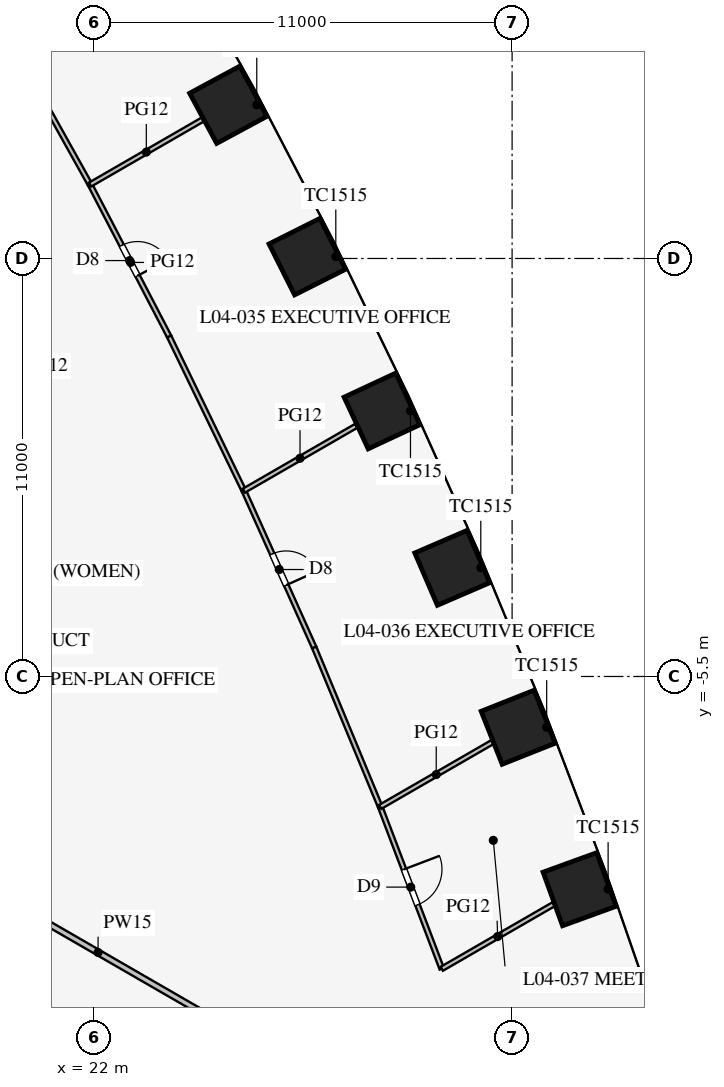
"""IFC4 building model, lengths in metres.
Left out: names, types, materials, properties, quantities, classifications, styles, units other than length and angle.
Written with IfcOpenShell. Run it as: python <this file> out.ifc"""

import sys

from ifc_helpers import new_model, si_unit, direction, frame, frame_2d, origin, origin_2d, place, context, subcontext, project, spatial, rectangle, extrude, element, fill, save


model = new_model("IFC4")
c1 = context("Model", 3, precision=1e-05, world=origin(), true_north=direction((0.0, 1.0)))
c2 = subcontext(c1, "Body", "Model", "MODEL_VIEW")
j1 = project(units=[si_unit("LENGTHUNIT", "METRE"), si_unit("PLANEANGLEUNIT", "RADIAN")], contexts=[c1])
p1 = place(None, origin())
s1 = spatial("IfcSite", under=j1, at=p1, CompositionType="ELEMENT")
p2 = place(p1, origin())
s2 = spatial("IfcBuilding", under=s1, at=p2, CompositionType="ELEMENT")
p3 = place(p2, frame((0.0, 0.0, 20.7)))
s3 = spatial("IfcBuildingStorey", under=s2, at=p3, CompositionType="ELEMENT", Elevation=20.7)
for number, where, z_axis, x_axis in (
    (1, (34.776, -11.099, 0.0), (0.0, 0.0, 1.0), (-0.342, 0.94, 0.0)),
    (2, (33.16, -6.836, 0.0), (0.0, 0.0, 1.0), (-0.369, 0.929, 0.0)),
    (3, (31.426, -2.641, 0.0), (0.0, 0.0, 1.0), (-0.396, 0.918, 0.0)),
    (4, (29.576, 1.487, 0.0), (0.0, 0.0, 1.0), (-0.423, 0.906, 0.0)),
    (5, (27.611, 5.549, 0.0), (0.0, 0.0, 1.0), (-0.449, 0.894, 0.0)),
    (6, (25.531, 9.544, 0.0), (0.0, 0.0, 1.0), (-0.475, 0.88, 0.0)),
):
    element("IfcColumn", number, at=place(p3, frame(where, z_axis=z_axis, x_axis=x_axis)), inside=s3, PredefinedType="COLUMN", context=c2, shape_type="SweptSolid", body=[
        extrude(rectangle(XDim=1.5, YDim=1.5, at=origin_2d()), origin(), (0.0, 0.0, 1.0), 4.2),
    ])
p4 = place(p3, frame((14.203, -8.2, 0.0), z_axis=(0.0, 0.0, 1.0), x_axis=(0.866024965723, -0.500000758745, 0.0)))
e7 = element("IfcWall", 7, at=p4, inside=s3, PredefinedType="PARTITIONING", context=c2, shape_type="SweptSolid", body=[
    extrude(rectangle(XDim=18.25, YDim=0.15, at=frame_2d((9.125, 0.0))), origin(), (0.0, 0.0, 1.0), 2.3),
])
p5 = place(p3, frame((11.613, 6.705, 0.0), z_axis=(0.0, 0.0, 1.0), x_axis=(0.86602785495, 0.499995754432, 0.0)))
e8 = element("IfcWall", 8, at=p5, inside=s3, PredefinedType="PARTITIONING", context=c2, shape_type="SweptSolid", body=[
    extrude(rectangle(XDim=12.759, YDim=0.15, at=frame_2d((6.379, 0.0))), origin(), (0.0, 0.0, 1.0), 3.2),
])
p6 = place(p3, frame((25.941, -0.611, 0.0), z_axis=(0.0, 0.0, 1.0), x_axis=(-0.435857917556, 0.900015486369, 0.0)))
e9 = element("IfcWall", 9, at=p6, inside=s3, PredefinedType="PARTITIONING", context=c2, shape_type="SweptSolid", body=[
    extrude(rectangle(XDim=4.512, YDim=0.12, at=frame_2d((2.256, 0.0))), origin(), (0.0, 0.0, 1.0), 2.9),
])
p7 = place(p3, frame((27.793, -4.738, 0.0), z_axis=(0.0, 0.0, 1.0), x_axis=(-0.409451055745, 0.912332084796, 0.0)))
e10 = element("IfcWall", 10, at=p7, inside=s3, PredefinedType="PARTITIONING", context=c2, shape_type="SweptSolid", body=[
    extrude(rectangle(XDim=4.523, YDim=0.12, at=frame_2d((2.262, 0.0))), origin(), (0.0, 0.0, 1.0), 2.9),
])
p8 = place(p7, frame((1.8, 0.0, 0.15)))
e11 = element("IfcOpeningElement", 11, at=p8, cuts=e10, PredefinedType="OPENING", context=c2, shape_type="SweptSolid", body=[
    extrude(rectangle(XDim=0.9, YDim=2.1, at=frame_2d((0.45, 1.05))), frame((0.0, 0.07, 0.0), z_axis=(0.0, -1.0, 0.0), x_axis=(1.0, 0.0, 0.0)), (0.0, 0.0, 1.0), 0.14),
])
p9 = place(p3, frame((29.53, -8.932, 0.0), z_axis=(0.0, 0.0, 1.0), x_axis=(-0.382639984525, 0.923897527999, 0.0)))
e12 = element("IfcWall", 12, at=p9, inside=s3, PredefinedType="PARTITIONING", context=c2, shape_type="SweptSolid", body=[
    extrude(rectangle(XDim=4.539, YDim=0.12, at=frame_2d((2.27, 0.0))), origin(), (0.0, 0.0, 1.0), 2.9),
])
p10 = place(p3, frame((31.15, -13.192, 0.0), z_axis=(0.0, 0.0, 1.0), x_axis=(-0.355369393324, 0.934725946087, 0.0)))
e13 = element("IfcWall", 13, at=p10, inside=s3, PredefinedType="PARTITIONING", context=c2, shape_type="SweptSolid", body=[
    extrude(rectangle(XDim=4.558, YDim=0.12, at=frame_2d((2.279, 0.0))), origin(), (0.0, 0.0, 1.0), 2.9),
])
p11 = place(p10, frame((1.8, 0.0, 0.15)))
e14 = element("IfcOpeningElement", 14, at=p11, cuts=e13, PredefinedType="OPENING", context=c2, shape_type="SweptSolid", body=[
    extrude(rectangle(XDim=1.0, YDim=2.1, at=frame_2d((0.5, 1.05))), frame((0.0, 0.07, 0.0), z_axis=(0.0, -1.0, 0.0), x_axis=(1.0, 0.0, 0.0)), (0.0, 0.0, 1.0), 0.14),
])
p12 = place(p3, frame((21.895, 7.445, 0.0), z_axis=(0.0, 0.0, 1.0), x_axis=(-0.487415216275, 0.87317031955, 0.0)))
e15 = element("IfcWall", 15, at=p12, inside=s3, PredefinedType="PARTITIONING", context=c2, shape_type="SweptSolid", body=[
    extrude(rectangle(XDim=4.5, YDim=0.12, at=frame_2d((2.25, 0.0))), origin(), (0.0, 0.0, 1.0), 2.9),
])
p13 = place(p3, frame((23.975, 3.449, 0.0), z_axis=(0.0, 0.0, 1.0), x_axis=(-0.461810056307, 0.886978845235, 0.0)))
e16 = element("IfcWall", 16, at=p13, inside=s3, PredefinedType="PARTITIONING", context=c2, shape_type="SweptSolid", body=[
    extrude(rectangle(XDim=4.504, YDim=0.12, at=frame_2d((2.252, 0.0))), origin(), (0.0, 0.0, 1.0), 2.9),
])
p14 = place(p13, frame((1.8, 0.0, 0.15)))
e17 = element("IfcOpeningElement", 17, at=p14, cuts=e16, PredefinedType="OPENING", context=c2, shape_type="SweptSolid", body=[
    extrude(rectangle(XDim=0.9, YDim=2.1, at=frame_2d((0.45, 1.05))), frame((0.0, 0.07, 0.0), z_axis=(0.0, -1.0, 0.0), x_axis=(1.0, 0.0, 0.0)), (0.0, 0.0, 1.0), 0.14),
])
p15 = place(p3, frame((25.941, -0.611, 0.0), z_axis=(0.0, 0.0, 1.0), x_axis=(0.866016478054, 0.500015459501, 0.0)))
e18 = element("IfcWall", 18, at=p15, inside=s3, PredefinedType="PARTITIONING", context=c2, shape_type="SweptSolid", body=[
    extrude(rectangle(XDim=3.414, YDim=0.12, at=frame_2d((1.707, 0.0))), origin(), (0.0, 0.0, 1.0), 2.9),
])
p16 = place(p3, frame((29.53, -8.932, 0.0), z_axis=(0.0, 0.0, 1.0), x_axis=(0.866018335219, 0.500012242915, 0.0)))
e19 = element("IfcWall", 19, at=p16, inside=s3, PredefinedType="PARTITIONING", context=c2, shape_type="SweptSolid", body=[
    extrude(rectangle(XDim=3.403, YDim=0.12, at=frame_2d((1.702, 0.0))), origin(), (0.0, 0.0, 1.0), 2.9),
])
p17 = place(p3, frame((31.15, -13.192, 0.0), z_axis=(0.0, 0.0, 1.0), x_axis=(0.866031132047, 0.499990078228, 0.0)))
e20 = element("IfcWall", 20, at=p17, inside=s3, PredefinedType="PARTITIONING", context=c2, shape_type="SweptSolid", body=[
    extrude(rectangle(XDim=3.396, YDim=0.12, at=frame_2d((1.698, 0.0))), origin(), (0.0, 0.0, 1.0), 2.9),
])
p18 = place(p3, frame((21.895, 7.445, 0.0), z_axis=(0.0, 0.0, 1.0), x_axis=(0.866015553834, 0.500017060227, 0.0)))
e21 = element("IfcWall", 21, at=p18, inside=s3, PredefinedType="PARTITIONING", context=c2, shape_type="SweptSolid", body=[
    extrude(rectangle(XDim=3.419, YDim=0.12, at=frame_2d((1.71, 0.0))), origin(), (0.0, 0.0, 1.0), 2.9),
])
p19 = place(p14, frame((0.9, 0.0, 0.0), z_axis=(0.0, 0.0, 1.0), x_axis=(-1.0, 0.0, 0.0)))
e22 = element("IfcDoor", 22, at=p19, inside=s3, OperationType="SINGLE_SWING_RIGHT", PredefinedType="DOOR", context=c2, shape_type="SweptSolid", body=[
    extrude(rectangle(XDim=0.9, YDim=2.1, at=frame_2d((0.45, 1.05))), frame((0.0, 0.025, 0.0), z_axis=(0.0, -1.0, 0.0), x_axis=(1.0, 0.0, 0.0)), (0.0, 0.0, 1.0), 0.05),
])
fill(e17, e22)
p20 = place(p8, frame((0.9, 0.0, 0.0), z_axis=(0.0, 0.0, 1.0), x_axis=(-1.0, 0.0, 0.0)))
e23 = element("IfcDoor", 23, at=p20, inside=s3, OperationType="SINGLE_SWING_RIGHT", PredefinedType="DOOR", context=c2, shape_type="SweptSolid", body=[
    extrude(rectangle(XDim=0.9, YDim=2.1, at=frame_2d((0.45, 1.05))), frame((0.0, 0.025, 0.0), z_axis=(0.0, -1.0, 0.0), x_axis=(1.0, 0.0, 0.0)), (0.0, 0.0, 1.0), 0.05),
])
fill(e11, e23)
p21 = place(p11, frame((1.0, 0.0, 0.0), z_axis=(0.0, 0.0, 1.0), x_axis=(-1.0, 0.0, 0.0)))
e24 = element("IfcDoor", 24, at=p21, inside=s3, OperationType="SINGLE_SWING_LEFT", PredefinedType="DOOR", context=c2, shape_type="SweptSolid", body=[
    extrude(rectangle(XDim=1.0, YDim=2.1, at=frame_2d((0.5, 1.05))), frame((0.0, 0.025, 0.0), z_axis=(0.0, -1.0, 0.0), x_axis=(1.0, 0.0, 0.0)), (0.0, 0.0, 1.0), 0.05),
])
fill(e14, e24)
save(model, sys.argv[1])
